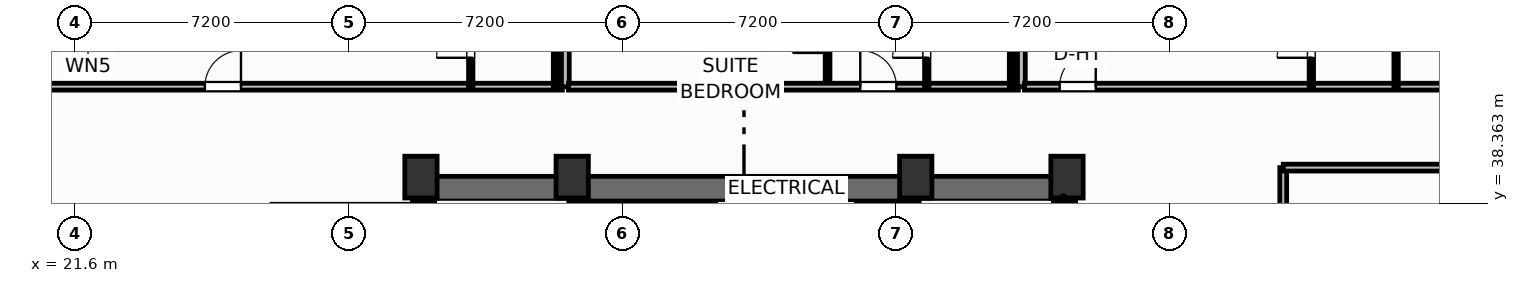
"""IFC4 building model, lengths in metres.
Left out: names, types, materials, properties, quantities, classifications, styles, units other than length and angle.
Written with IfcOpenShell. Run it as: python <this file> out.ifc"""

import sys

from ifc_helpers import new_model, si_unit, direction, frame, frame_2d, origin, origin_2d, place, context, subcontext, project, spatial, rectangle, extrude, element, fill, save


model = new_model("IFC4")
c1 = context("Model", 3, precision=1e-05, world=origin(), true_north=direction((0.0, 1.0)))
c2 = subcontext(c1, "Body", "Model", "MODEL_VIEW")
j1 = project(units=[si_unit("LENGTHUNIT", "METRE"), si_unit("PLANEANGLEUNIT", "RADIAN")], contexts=[c1])
p1 = place(None, origin())
s1 = spatial("IfcSite", under=j1, at=p1, CompositionType="ELEMENT")
p2 = place(p1, origin())
s2 = spatial("IfcBuilding", under=s1, at=p2, CompositionType="ELEMENT")
p3 = place(p2, frame((0.0, 0.0, 167.2)))
s3 = spatial("IfcBuildingStorey", under=s2, at=p3, CompositionType="ELEMENT", Elevation=167.2)
for number, where, z_axis, x_axis in (
    (1, (30.7, 39.05, 0.0), (0.0, 0.0, 1.0), (1.0, 0.0, 0.0)),
    (2, (34.68, 39.05, 0.0), (0.0, 0.0, 1.0), (1.0, 0.0, 0.0)),
    (3, (43.72, 39.05, 0.0), (0.0, 0.0, 1.0), (1.0, 0.0, 0.0)),
    (4, (47.7, 39.05, 0.0), (0.0, 0.0, 1.0), (1.0, 0.0, 0.0)),
):
    element("IfcColumn", number, at=place(p3, frame(where, z_axis=z_axis, x_axis=x_axis)), inside=s3, PredefinedType="COLUMN", context=c2, shape_type="SweptSolid", body=[
        extrude(rectangle(XDim=0.85, YDim=1.1, at=origin_2d()), origin(), (0.0, 0.0, 1.0), 3.7),
    ])
p4 = place(p3, frame((30.48, 38.745, 0.0), z_axis=(0.0, 0.0, 1.0), x_axis=(1.0, 0.0, 0.0)))
e5 = element("IfcWall", 5, at=p4, inside=s3, PredefinedType="SHEAR", context=c2, shape_type="SweptSolid", body=[
    extrude(rectangle(XDim=17.44, YDim=0.65, at=frame_2d((8.72, 0.0))), origin(), (0.0, 0.0, 1.0), 3.45),
])
for number, where, z_axis, x_axis in (
    (6, (30.805, 29.2, 0.0), (0.0, 0.0, 1.0), (0.0, 1.0, 0.0)),
    (7, (47.595, 29.2, 0.0), (0.0, 0.0, 1.0), (0.0, 1.0, 0.0)),
):
    element("IfcWall", number, at=place(p3, frame(where, z_axis=z_axis, x_axis=x_axis)), inside=s3, PredefinedType="SHEAR", context=c2, shape_type="SweptSolid", body=[
        extrude(rectangle(XDim=9.22, YDim=0.65, at=frame_2d((4.61, 0.0))), origin(), (0.0, 0.0, 1.0), 3.45),
    ])
p5 = place(p3, frame((34.64, 29.2, 0.0), z_axis=(0.0, 0.0, 1.0), x_axis=(0.0, 1.0, 0.0)))
e8 = element("IfcWall", 8, at=p5, inside=s3, PredefinedType="SHEAR", context=c2, shape_type="SweptSolid", body=[
    extrude(rectangle(XDim=9.22, YDim=0.25, at=frame_2d((4.61, 0.0))), origin(), (0.0, 0.0, 1.0), 3.45),
])
p6 = place(p5, frame((0.65, 0.0, 0.0)))
e9 = element("IfcOpeningElement", 9, at=p6, cuts=e8, PredefinedType="OPENING", context=c2, shape_type="SweptSolid", body=[
    extrude(rectangle(XDim=1.05, YDim=2.15, at=frame_2d((0.525, 1.075))), frame((0.0, 0.135, 0.0), z_axis=(0.0, -1.0, 0.0), x_axis=(1.0, 0.0, 0.0)), (0.0, 0.0, 1.0), 0.27),
])
p7 = place(p3, frame((43.76, 29.2, 0.0), z_axis=(0.0, 0.0, 1.0), x_axis=(0.0, 1.0, 0.0)))
e10 = element("IfcWall", 10, at=p7, inside=s3, PredefinedType="SHEAR", context=c2, shape_type="SweptSolid", body=[
    extrude(rectangle(XDim=9.22, YDim=0.25, at=frame_2d((4.61, 0.0))), origin(), (0.0, 0.0, 1.0), 3.45),
])
p8 = place(p7, frame((0.65, 0.0, 0.0)))
e11 = element("IfcOpeningElement", 11, at=p8, cuts=e10, PredefinedType="OPENING", context=c2, shape_type="SweptSolid", body=[
    extrude(rectangle(XDim=1.05, YDim=2.15, at=frame_2d((0.525, 1.075))), frame((0.0, 0.135, 0.0), z_axis=(0.0, -1.0, 0.0), x_axis=(1.0, 0.0, 0.0)), (0.0, 0.0, 1.0), 0.27),
])
p9 = place(p3, frame((3.393, 41.43, 0.0), z_axis=(0.0, 0.0, 1.0), x_axis=(1.0, 0.0, 0.0)))
e12 = element("IfcWall", 12, at=p9, inside=s3, PredefinedType="PARTITIONING", context=c2, shape_type="SweptSolid", body=[
    extrude(rectangle(XDim=31.027, YDim=0.18, at=frame_2d((15.513, 0.0))), origin(), (0.0, 0.0, 1.0), 2.662),
])
p10 = place(p9, frame((21.621, 0.0, 0.0)))
e13 = element("IfcOpeningElement", 13, at=p10, cuts=e12, PredefinedType="OPENING", context=c2, shape_type="SweptSolid", body=[
    extrude(rectangle(XDim=0.95, YDim=2.15, at=frame_2d((0.475, 1.075))), frame((0.0, 0.1, 0.0), z_axis=(0.0, -1.0, 0.0), x_axis=(1.0, 0.0, 0.0)), (0.0, 0.0, 1.0), 0.2),
])
p11 = place(p3, frame((32.01, 41.43, 0.0), z_axis=(0.0, 0.0, 1.0), x_axis=(0.0, 1.0, 0.0)))
e14 = element("IfcWall", 14, at=p11, inside=s3, PredefinedType="PARTITIONING", context=c2, shape_type="SweptSolid", body=[
    extrude(rectangle(XDim=2.52, YDim=0.115, at=frame_2d((1.26, 0.0))), origin(), (0.0, 0.0, 1.0), 3.45),
])
p12 = place(p11, frame((0.76, 0.0, 0.0)))
e15 = element("IfcOpeningElement", 15, at=p12, cuts=e14, PredefinedType="OPENING", context=c2, shape_type="SweptSolid", body=[
    extrude(rectangle(XDim=0.9, YDim=2.05, at=frame_2d((0.45, 1.025))), frame((0.0, 0.067, 0.0), z_axis=(0.0, -1.0, 0.0), x_axis=(1.0, 0.0, 0.0)), (0.0, 0.0, 1.0), 0.135),
])
p13 = place(p3, frame((34.24, 41.43, 0.0), z_axis=(0.0, 0.0, 1.0), x_axis=(0.0, 1.0, 0.0)))
e16 = element("IfcWall", 16, at=p13, inside=s3, PredefinedType="PARTITIONING", context=c2, shape_type="SweptSolid", body=[
    extrude(rectangle(XDim=2.52, YDim=0.115, at=frame_2d((1.26, 0.0))), origin(), (0.0, 0.0, 1.0), 3.45),
])
p14 = place(p3, frame((34.5, 41.43, 0.0), z_axis=(0.0, 0.0, 1.0), x_axis=(0.0, 1.0, 0.0)))
e17 = element("IfcWall", 17, at=p14, inside=s3, PredefinedType="PARTITIONING", context=c2, shape_type="SweptSolid", body=[
    extrude(rectangle(XDim=3.104, YDim=0.205, at=frame_2d((1.552, 0.0))), origin(), (0.0, 0.0, 1.0), 3.45),
])
p15 = place(p3, frame((41.4, 41.43, 0.0), z_axis=(0.0, 0.0, 1.0), x_axis=(0.0, 1.0, 0.0)))
e18 = element("IfcWall", 18, at=p15, inside=s3, PredefinedType="PARTITIONING", context=c2, shape_type="SweptSolid", body=[
    extrude(rectangle(XDim=6.056, YDim=0.125, at=frame_2d((3.028, 0.0))), origin(), (0.0, 0.0, 1.0), 3.45),
])
p16 = place(p15, frame((0.888, 0.0, 0.0)))
e19 = element("IfcOpeningElement", 19, at=p16, cuts=e18, PredefinedType="OPENING", context=c2, shape_type="SweptSolid", body=[
    extrude(rectangle(XDim=0.92, YDim=2.05, at=frame_2d((0.46, 1.025))), frame((0.0, 0.073, 0.0), z_axis=(0.0, -1.0, 0.0), x_axis=(1.0, 0.0, 0.0)), (0.0, 0.0, 1.0), 0.145),
])
p17 = place(p3, frame((34.58, 41.43, 0.0), z_axis=(0.0, 0.0, 1.0), x_axis=(1.0, 0.0, 0.0)))
e20 = element("IfcWall", 20, at=p17, inside=s3, PredefinedType="PARTITIONING", context=c2, shape_type="SweptSolid", body=[
    extrude(rectangle(XDim=11.84, YDim=0.18, at=frame_2d((5.92, 0.0))), origin(), (0.0, 0.0, 1.0), 3.45),
])
p18 = place(p17, frame((7.68, 0.0, 0.0)))
e21 = element("IfcOpeningElement", 21, at=p18, cuts=e20, PredefinedType="OPENING", context=c2, shape_type="SweptSolid", body=[
    extrude(rectangle(XDim=0.95, YDim=2.15, at=frame_2d((0.475, 1.075))), frame((0.0, 0.1, 0.0), z_axis=(0.0, -1.0, 0.0), x_axis=(1.0, 0.0, 0.0)), (0.0, 0.0, 1.0), 0.2),
])
p19 = place(p3, frame((44.01, 41.43, 0.0), z_axis=(0.0, 0.0, 1.0), x_axis=(0.0, 1.0, 0.0)))
e22 = element("IfcWall", 22, at=p19, inside=s3, PredefinedType="PARTITIONING", context=c2, shape_type="SweptSolid", body=[
    extrude(rectangle(XDim=2.52, YDim=0.115, at=frame_2d((1.26, 0.0))), origin(), (0.0, 0.0, 1.0), 3.45),
])
p20 = place(p19, frame((0.76, 0.0, 0.0)))
e23 = element("IfcOpeningElement", 23, at=p20, cuts=e22, PredefinedType="OPENING", context=c2, shape_type="SweptSolid", body=[
    extrude(rectangle(XDim=0.9, YDim=2.05, at=frame_2d((0.45, 1.025))), frame((0.0, 0.067, 0.0), z_axis=(0.0, -1.0, 0.0), x_axis=(1.0, 0.0, 0.0)), (0.0, 0.0, 1.0), 0.135),
])
p21 = place(p3, frame((46.24, 41.43, 0.0), z_axis=(0.0, 0.0, 1.0), x_axis=(0.0, 1.0, 0.0)))
e24 = element("IfcWall", 24, at=p21, inside=s3, PredefinedType="PARTITIONING", context=c2, shape_type="SweptSolid", body=[
    extrude(rectangle(XDim=2.52, YDim=0.115, at=frame_2d((1.26, 0.0))), origin(), (0.0, 0.0, 1.0), 3.45),
])
p22 = place(p3, frame((46.5, 41.43, 0.0), z_axis=(0.0, 0.0, 1.0), x_axis=(0.0, 1.0, 0.0)))
e25 = element("IfcWall", 25, at=p22, inside=s3, PredefinedType="PARTITIONING", context=c2, shape_type="SweptSolid", body=[
    extrude(rectangle(XDim=6.674, YDim=0.205, at=frame_2d((3.337, 0.0))), origin(), (0.0, 0.0, 1.0), 2.662),
])
p23 = place(p3, frame((46.58, 41.43, 0.0), z_axis=(0.0, 0.0, 1.0), x_axis=(1.0, 0.0, 0.0)))
e26 = element("IfcWall", 26, at=p23, inside=s3, PredefinedType="PARTITIONING", context=c2, shape_type="SweptSolid", body=[
    extrude(rectangle(XDim=26.042, YDim=0.18, at=frame_2d((13.021, 0.0))), origin(), (0.0, 0.0, 1.0), 3.45),
])
p24 = place(p23, frame((0.926, 0.0, 0.0)))
e27 = element("IfcOpeningElement", 27, at=p24, cuts=e26, PredefinedType="OPENING", context=c2, shape_type="SweptSolid", body=[
    extrude(rectangle(XDim=0.95, YDim=2.15, at=frame_2d((0.475, 1.075))), frame((0.0, 0.1, 0.0), z_axis=(0.0, -1.0, 0.0), x_axis=(1.0, 0.0, 0.0)), (0.0, 0.0, 1.0), 0.2),
])
p25 = place(p3, frame((54.13, 41.43, 0.0), z_axis=(0.0, 0.0, 1.0), x_axis=(0.0, 1.0, 0.0)))
e28 = element("IfcWall", 28, at=p25, inside=s3, PredefinedType="PARTITIONING", context=c2, shape_type="SweptSolid", body=[
    extrude(rectangle(XDim=2.52, YDim=0.115, at=frame_2d((1.26, 0.0))), origin(), (0.0, 0.0, 1.0), 3.45),
])
p26 = place(p25, frame((0.76, 0.0, 0.0)))
e29 = element("IfcOpeningElement", 29, at=p26, cuts=e28, PredefinedType="OPENING", context=c2, shape_type="SweptSolid", body=[
    extrude(rectangle(XDim=0.9, YDim=2.05, at=frame_2d((0.45, 1.025))), frame((0.0, 0.067, 0.0), z_axis=(0.0, -1.0, 0.0), x_axis=(1.0, 0.0, 0.0)), (0.0, 0.0, 1.0), 0.135),
])
p27 = place(p3, frame((56.36, 41.43, 0.0), z_axis=(0.0, 0.0, 1.0), x_axis=(0.0, 1.0, 0.0)))
e30 = element("IfcWall", 30, at=p27, inside=s3, PredefinedType="PARTITIONING", context=c2, shape_type="SweptSolid", body=[
    extrude(rectangle(XDim=2.52, YDim=0.115, at=frame_2d((1.26, 0.0))), origin(), (0.0, 0.0, 1.0), 3.45),
])
p28 = place(p3, frame((53.39, 19.24, 0.0), z_axis=(0.0, 0.0, 1.0), x_axis=(0.0, 1.0, 0.0)))
e31 = element("IfcWall", 31, at=p28, inside=s3, PredefinedType="PARTITIONING", context=c2, shape_type="SweptSolid", body=[
    extrude(rectangle(XDim=20.06, YDim=0.18, at=frame_2d((10.03, 0.0))), origin(), (0.0, 0.0, 1.0), 3.45),
])
p29 = place(p28, frame((7.7, 0.0, 0.0)))
e32 = element("IfcOpeningElement", 32, at=p29, cuts=e31, PredefinedType="OPENING", context=c2, shape_type="SweptSolid", body=[
    extrude(rectangle(XDim=0.95, YDim=2.05, at=frame_2d((0.475, 1.025))), frame((0.0, 0.1, 0.0), z_axis=(0.0, -1.0, 0.0), x_axis=(1.0, 0.0, 0.0)), (0.0, 0.0, 1.0), 0.2),
])
p30 = place(p3, frame((53.39, 39.3, 0.0), z_axis=(0.0, 0.0, 1.0), x_axis=(1.0, 0.0, 0.0)))
e33 = element("IfcWall", 33, at=p30, inside=s3, PredefinedType="PARTITIONING", context=c2, shape_type="SweptSolid", body=[
    extrude(rectangle(XDim=19.49, YDim=0.18, at=frame_2d((9.745, 0.0))), origin(), (0.0, 0.0, 1.0), 3.45),
])
p31 = place(p10, origin())
e34 = element("IfcDoor", 34, at=p31, inside=s3, OperationType="SINGLE_SWING_RIGHT", PredefinedType="DOOR", context=c2, shape_type="SweptSolid", body=[
    extrude(rectangle(XDim=0.95, YDim=2.15, at=frame_2d((0.475, 1.075))), frame((0.0, 0.025, 0.0), z_axis=(0.0, -1.0, 0.0), x_axis=(1.0, 0.0, 0.0)), (0.0, 0.0, 1.0), 0.05),
])
fill(e13, e34)
p32 = place(p12, origin())
e35 = element("IfcDoor", 35, at=p32, inside=s3, OperationType="SINGLE_SWING_LEFT", PredefinedType="DOOR", context=c2, shape_type="SweptSolid", body=[
    extrude(rectangle(XDim=0.9, YDim=2.05, at=frame_2d((0.45, 1.025))), frame((0.0, 0.025, 0.0), z_axis=(0.0, -1.0, 0.0), x_axis=(1.0, 0.0, 0.0)), (0.0, 0.0, 1.0), 0.05),
])
fill(e15, e35)
p33 = place(p16, origin())
e36 = element("IfcDoor", 36, at=p33, inside=s3, OperationType="SINGLE_SWING_LEFT", PredefinedType="DOOR", context=c2, shape_type="SweptSolid", body=[
    extrude(rectangle(XDim=0.92, YDim=2.05, at=frame_2d((0.46, 1.025))), frame((0.0, 0.025, 0.0), z_axis=(0.0, -1.0, 0.0), x_axis=(1.0, 0.0, 0.0)), (0.0, 0.0, 1.0), 0.05),
])
fill(e19, e36)
p34 = place(p18, origin())
e37 = element("IfcDoor", 37, at=p34, inside=s3, OperationType="SINGLE_SWING_LEFT", PredefinedType="DOOR", context=c2, shape_type="SweptSolid", body=[
    extrude(rectangle(XDim=0.95, YDim=2.15, at=frame_2d((0.475, 1.075))), frame((0.0, 0.025, 0.0), z_axis=(0.0, -1.0, 0.0), x_axis=(1.0, 0.0, 0.0)), (0.0, 0.0, 1.0), 0.05),
])
fill(e21, e37)
p35 = place(p20, origin())
e38 = element("IfcDoor", 38, at=p35, inside=s3, OperationType="SINGLE_SWING_LEFT", PredefinedType="DOOR", context=c2, shape_type="SweptSolid", body=[
    extrude(rectangle(XDim=0.9, YDim=2.05, at=frame_2d((0.45, 1.025))), frame((0.0, 0.025, 0.0), z_axis=(0.0, -1.0, 0.0), x_axis=(1.0, 0.0, 0.0)), (0.0, 0.0, 1.0), 0.05),
])
fill(e23, e38)
p36 = place(p24, origin())
e39 = element("IfcDoor", 39, at=p36, inside=s3, OperationType="SINGLE_SWING_RIGHT", PredefinedType="DOOR", context=c2, shape_type="SweptSolid", body=[
    extrude(rectangle(XDim=0.95, YDim=2.15, at=frame_2d((0.475, 1.075))), frame((0.0, 0.025, 0.0), z_axis=(0.0, -1.0, 0.0), x_axis=(1.0, 0.0, 0.0)), (0.0, 0.0, 1.0), 0.05),
])
fill(e27, e39)
p37 = place(p26, origin())
e40 = element("IfcDoor", 40, at=p37, inside=s3, OperationType="SINGLE_SWING_LEFT", PredefinedType="DOOR", context=c2, shape_type="SweptSolid", body=[
    extrude(rectangle(XDim=0.9, YDim=2.05, at=frame_2d((0.45, 1.025))), frame((0.0, 0.025, 0.0), z_axis=(0.0, -1.0, 0.0), x_axis=(1.0, 0.0, 0.0)), (0.0, 0.0, 1.0), 0.05),
])
fill(e29, e40)
save(model, sys.argv[1])
